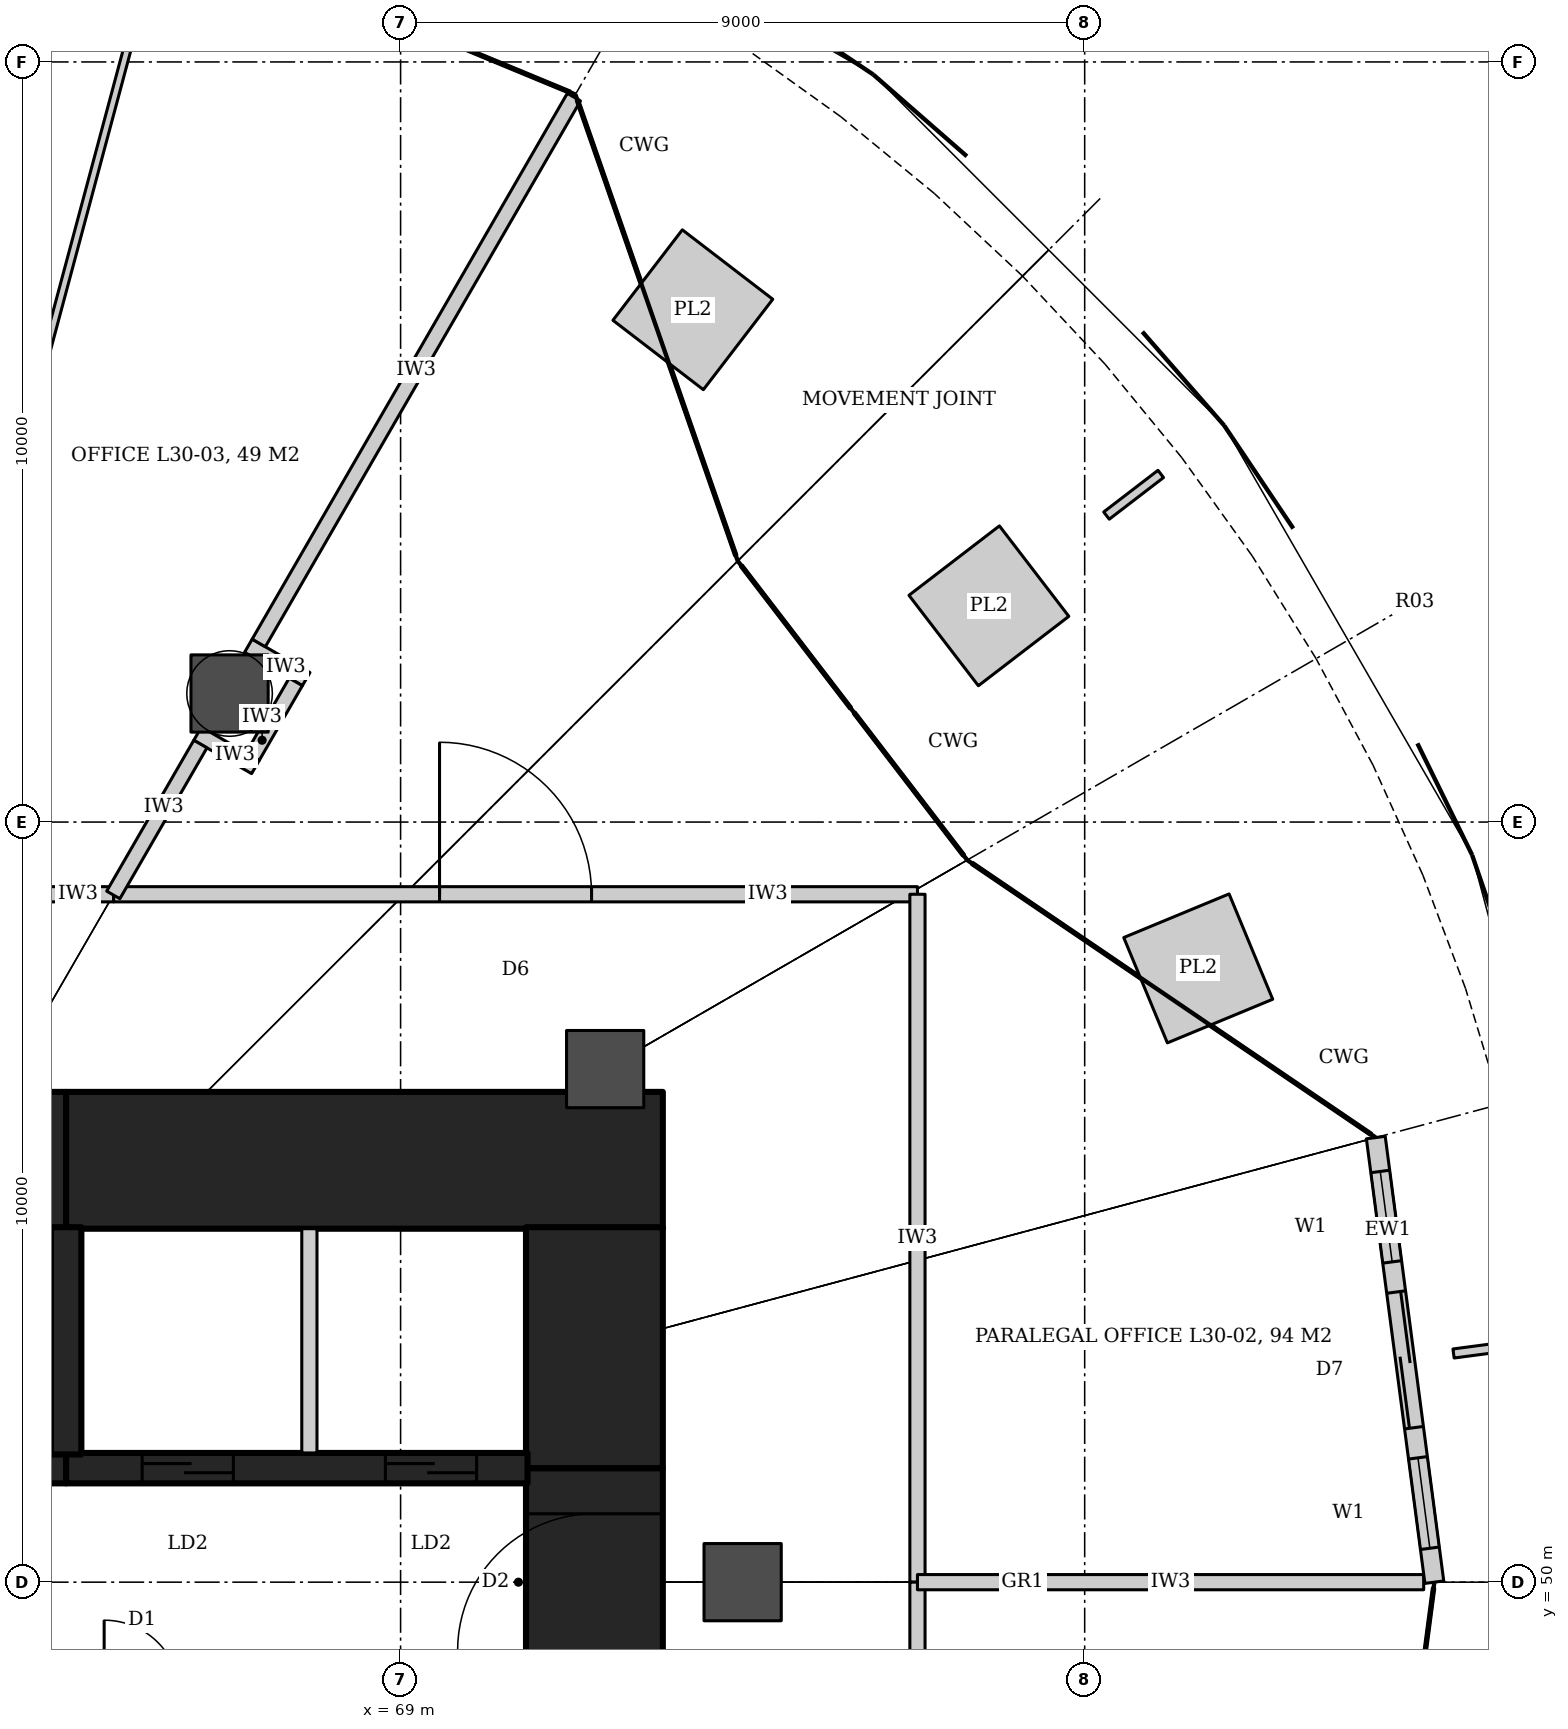
"""IFC4 building model, lengths in metres.
Left out: names, types, materials, properties, quantities, classifications, styles, units other than length and angle.
Written with IfcOpenShell. Run it as: python <this file> out.ifc"""

import sys

from ifc_helpers import new_model, si_unit, direction, frame, frame_2d, origin, origin_2d, place, context, subcontext, project, spatial, rectangle, hollow_circle, extrude, element, fill, save


model = new_model("IFC4")
c1 = context("Model", 3, precision=1e-05, world=origin(), true_north=direction((0.0, 1.0)))
c2 = subcontext(c1, "Body", "Model", "MODEL_VIEW")
j1 = project(units=[si_unit("LENGTHUNIT", "METRE"), si_unit("PLANEANGLEUNIT", "RADIAN")], contexts=[c1])
p1 = place(None, origin())
s1 = spatial("IfcSite", under=j1, at=p1, CompositionType="ELEMENT")
p2 = place(p1, origin())
s2 = spatial("IfcBuilding", under=s1, at=p2, CompositionType="ELEMENT")
p3 = place(p2, frame((0.0, 0.0, 135.2)))
s3 = spatial("IfcBuildingStorey", under=s2, at=p3, CompositionType="ELEMENT", Elevation=135.2)
p4 = place(p3, frame((55.4, 55.55, 0.0), z_axis=(0.0, 0.0, 1.0), x_axis=(1.0, 0.0, 0.0)))
e1 = element("IfcWall", 1, at=p4, inside=s3, PredefinedType="SHEAR", context=c2, shape_type="SweptSolid", body=[
    extrude(rectangle(XDim=9.2, YDim=1.8, at=frame_2d((4.6, 0.0))), origin(), (0.0, 0.0, 1.0), 4.2),
])
p5 = place(p3, frame((64.6, 55.55, 0.0), z_axis=(0.0, 0.0, 1.0), x_axis=(1.0, 0.0, 0.0)))
e2 = element("IfcWall", 2, at=p5, inside=s3, PredefinedType="SHEAR", context=c2, shape_type="SweptSolid", body=[
    extrude(rectangle(XDim=7.85, YDim=1.8, at=frame_2d((3.925, 0.0))), origin(), (0.0, 0.0, 1.0), 4.2),
])
p6 = place(p3, frame((71.55, 48.5, 0.0), z_axis=(0.0, 0.0, 1.0), x_axis=(0.0, 1.0, 0.0)))
e3 = element("IfcWall", 3, at=p6, inside=s3, PredefinedType="SHEAR", context=c2, shape_type="SweptSolid", body=[
    extrude(rectangle(XDim=3.0, YDim=1.8, at=frame_2d((1.5, 0.0))), origin(), (0.0, 0.0, 1.0), 4.2),
])
p7 = place(p6, frame((0.6, 0.0, 0.0)))
e4 = element("IfcOpeningElement", 4, at=p7, cuts=e3, PredefinedType="OPENING", context=c2, shape_type="SweptSolid", body=[
    extrude(rectangle(XDim=1.8, YDim=2.1, at=frame_2d((0.9, 1.05))), frame((0.0, 0.91, 0.0), z_axis=(0.0, -1.0, 0.0), x_axis=(1.0, 0.0, 0.0)), (0.0, 0.0, 1.0), 1.82),
])
p8 = place(p3, frame((71.55, 51.5, 0.0), z_axis=(0.0, 0.0, 1.0), x_axis=(0.0, 1.0, 0.0)))
e5 = element("IfcWall", 5, at=p8, inside=s3, PredefinedType="SHEAR", context=c2, shape_type="SweptSolid", body=[
    extrude(rectangle(XDim=3.17, YDim=1.8, at=frame_2d((1.585, 0.0))), origin(), (0.0, 0.0, 1.0), 4.2),
])
p9 = place(p3, frame((55.4, 51.5, 0.0), z_axis=(0.0, 0.0, 1.0), x_axis=(1.0, 0.0, 0.0)))
e6 = element("IfcWall", 6, at=p9, inside=s3, PredefinedType="SHEAR", context=c2, shape_type="SweptSolid", body=[
    extrude(rectangle(XDim=9.2, YDim=0.4, at=frame_2d((4.6, 0.0))), origin(), (0.0, 0.0, 1.0), 4.2),
])
p10 = place(p9, frame((1.6, 0.0, 0.0)))
e7 = element("IfcOpeningElement", 7, at=p10, cuts=e6, PredefinedType="OPENING", context=c2, shape_type="SweptSolid", body=[
    extrude(rectangle(XDim=0.8, YDim=2.1, at=frame_2d((0.4, 1.05))), frame((0.0, 0.21, 0.0), z_axis=(0.0, -1.0, 0.0), x_axis=(1.0, 0.0, 0.0)), (0.0, 0.0, 1.0), 0.42),
])
p11 = place(p9, frame((4.7, 0.0, 0.0)))
e8 = element("IfcOpeningElement", 8, at=p11, cuts=e6, PredefinedType="OPENING", context=c2, shape_type="SweptSolid", body=[
    extrude(rectangle(XDim=0.8, YDim=2.1, at=frame_2d((0.4, 1.05))), frame((0.0, 0.21, 0.0), z_axis=(0.0, -1.0, 0.0), x_axis=(1.0, 0.0, 0.0)), (0.0, 0.0, 1.0), 0.42),
])
p12 = place(p9, frame((7.3, 0.0, 0.0)))
e9 = element("IfcOpeningElement", 9, at=p12, cuts=e6, PredefinedType="OPENING", context=c2, shape_type="SweptSolid", body=[
    extrude(rectangle(XDim=0.8, YDim=2.1, at=frame_2d((0.4, 1.05))), frame((0.0, 0.21, 0.0), z_axis=(0.0, -1.0, 0.0), x_axis=(1.0, 0.0, 0.0)), (0.0, 0.0, 1.0), 0.42),
])
p13 = place(p3, frame((64.6, 51.5, 0.0), z_axis=(0.0, 0.0, 1.0), x_axis=(1.0, 0.0, 0.0)))
e10 = element("IfcWall", 10, at=p13, inside=s3, PredefinedType="SHEAR", context=c2, shape_type="SweptSolid", body=[
    extrude(rectangle(XDim=6.07, YDim=0.4, at=frame_2d((3.035, 0.0))), origin(), (0.0, 0.0, 1.0), 4.2),
])
p14 = place(p13, frame((1.0, 0.0, 0.0)))
e11 = element("IfcOpeningElement", 11, at=p14, cuts=e10, PredefinedType="OPENING", context=c2, shape_type="SweptSolid", body=[
    extrude(rectangle(XDim=1.2, YDim=2.1, at=frame_2d((0.6, 1.05))), frame((0.0, 0.21, 0.0), z_axis=(0.0, -1.0, 0.0), x_axis=(1.0, 0.0, 0.0)), (0.0, 0.0, 1.0), 0.42),
])
p15 = place(p13, frame((4.2, 0.0, 0.0)))
e12 = element("IfcOpeningElement", 12, at=p15, cuts=e10, PredefinedType="OPENING", context=c2, shape_type="SweptSolid", body=[
    extrude(rectangle(XDim=1.2, YDim=2.1, at=frame_2d((0.6, 1.05))), frame((0.0, 0.21, 0.0), z_axis=(0.0, -1.0, 0.0), x_axis=(1.0, 0.0, 0.0)), (0.0, 0.0, 1.0), 0.42),
])
p16 = place(p3, frame((64.6, 51.68, 0.0), z_axis=(0.0, 0.0, 1.0), x_axis=(0.0, 1.0, 0.0)))
e13 = element("IfcWall", 13, at=p16, inside=s3, PredefinedType="SHEAR", context=c2, shape_type="SweptSolid", body=[
    extrude(rectangle(XDim=2.99, YDim=0.4, at=frame_2d((1.495, 0.0))), origin(), (0.0, 0.0, 1.0), 4.2),
])
for number, where, z_axis, x_axis in (
    (14, (73.5, 50.0, 0.0), (0.0, 0.0, 1.0), (1.0, 0.0, 0.0)),
    (15, (71.691, 56.75, 0.0), (0.0, 0.0, 1.0), (1.0, 0.0, 0.0)),
    (16, (66.75, 61.691, 0.0), (0.0, 0.0, 1.0), (1.0, 0.0, 0.0)),
):
    element("IfcColumn", number, at=place(p3, frame(where, z_axis=z_axis, x_axis=x_axis)), inside=s3, PredefinedType="COLUMN", context=c2, shape_type="SweptSolid", body=[
        extrude(hollow_circle(Radius=0.508, WallThickness=0.05, at=origin_2d()), origin(), (0.0, 0.0, 1.0), 4.2),
    ])
p17 = place(p3, frame((62.425, 59.05, 0.0), z_axis=(0.0, 0.0, 1.0), x_axis=(1.0, 0.0, 0.0)))
e17 = element("IfcWall", 17, at=p17, inside=s3, PredefinedType="PARTITIONING", context=c2, shape_type="SweptSolid", body=[
    extrude(rectangle(XDim=2.8, YDim=0.2, at=frame_2d((1.4, 0.0))), origin(), (0.0, 0.0, 1.0), 3.04),
])
p18 = place(p17, frame((0.95, 0.0, 0.0)))
e18 = element("IfcOpeningElement", 18, at=p18, cuts=e17, PredefinedType="OPENING", context=c2, shape_type="SweptSolid", body=[
    extrude(rectangle(XDim=0.9, YDim=2.4, at=frame_2d((0.45, 1.2))), frame((0.0, 0.11, 0.0), z_axis=(0.0, -1.0, 0.0), x_axis=(1.0, 0.0, 0.0)), (0.0, 0.0, 1.0), 0.22),
])
p19 = place(p3, frame((65.225, 59.05, 0.0), z_axis=(0.0, 0.0, 1.0), x_axis=(1.0, 0.0, 0.0)))
e19 = element("IfcWall", 19, at=p19, inside=s3, PredefinedType="PARTITIONING", context=c2, shape_type="SweptSolid", body=[
    extrude(rectangle(XDim=10.575, YDim=0.2, at=frame_2d((5.288, 0.0))), origin(), (0.0, 0.0, 1.0), 3.02),
])
p20 = place(p19, frame((4.288, 0.0, 0.0)))
e20 = element("IfcOpeningElement", 20, at=p20, cuts=e19, PredefinedType="OPENING", context=c2, shape_type="SweptSolid", body=[
    extrude(rectangle(XDim=2.0, YDim=2.1, at=frame_2d((1.0, 1.05))), frame((0.0, 0.11, 0.0), z_axis=(0.0, -1.0, 0.0), x_axis=(1.0, 0.0, 0.0)), (0.0, 0.0, 1.0), 0.22),
])
p21 = place(p3, frame((75.8, 59.05, 0.0), z_axis=(0.0, 0.0, 1.0), x_axis=(0.0, -1.0, 0.0)))
e21 = element("IfcWall", 21, at=p21, inside=s3, PredefinedType="PARTITIONING", context=c2, shape_type="SweptSolid", body=[
    extrude(rectangle(XDim=9.05, YDim=0.2, at=frame_2d((4.525, 0.0))), origin(), (0.0, 0.0, 1.0), 3.04),
])
p22 = place(p3, frame((75.8, 50.0, 0.0), z_axis=(0.0, 0.0, 1.0), x_axis=(0.0, -1.0, 0.0)))
e22 = element("IfcWall", 22, at=p22, inside=s3, PredefinedType="PARTITIONING", context=c2, shape_type="SweptSolid", body=[
    extrude(rectangle(XDim=9.122, YDim=0.2, at=frame_2d((4.561, 0.0))), origin(), (0.0, 0.0, 1.0), 3.04),
])
p23 = place(p22, frame((4.061, 0.0, 0.0)))
e23 = element("IfcOpeningElement", 23, at=p23, cuts=e22, PredefinedType="OPENING", context=c2, shape_type="SweptSolid", body=[
    extrude(rectangle(XDim=1.0, YDim=2.1, at=frame_2d((0.5, 1.05))), frame((0.0, 0.11, 0.0), z_axis=(0.0, -1.0, 0.0), x_axis=(1.0, 0.0, 0.0)), (0.0, 0.0, 1.0), 0.22),
])
p24 = place(p3, frame((75.8, 50.0, 0.0), z_axis=(0.0, 0.0, 1.0), x_axis=(1.0, 0.0, 0.0)))
e24 = element("IfcWall", 24, at=p24, inside=s3, PredefinedType="PARTITIONING", context=c2, shape_type="SweptSolid", body=[
    extrude(rectangle(XDim=6.66, YDim=0.2, at=frame_2d((3.33, 0.0))), origin(), (0.0, 0.0, 1.0), 3.04),
])
for number, where, z_axis, x_axis in (
    (25, (66.329, 61.163, 0.0), (0.0, 0.0, 1.0), (0.866, -0.5, 0.0)),
    (26, (66.997, 62.32, 0.0), (0.0, 0.0, 1.0), (0.866, -0.5, 0.0)),
):
    element("IfcWall", number, at=place(p3, frame(where, z_axis=z_axis, x_axis=x_axis)), inside=s3, PredefinedType="PARTITIONING", context=c2, shape_type="SweptSolid", body=[
        extrude(rectangle(XDim=0.878, YDim=0.2, at=frame_2d((0.439, 0.0))), origin(), (0.0, 0.0, 1.0), 3.02),
    ])
p25 = place(p3, frame((67.053, 60.86, 0.0), z_axis=(0.0, 0.0, 1.0), x_axis=(0.499883687939, 0.866092546171, 0.0)))
e27 = element("IfcWall", 27, at=p25, inside=s3, PredefinedType="PARTITIONING", context=c2, shape_type="SweptSolid", body=[
    extrude(rectangle(XDim=1.136, YDim=0.2, at=frame_2d((0.568, 0.0))), origin(), (0.0, 0.0, 1.0), 3.02),
])
p26 = place(p3, frame((65.22, 59.041, 0.0), z_axis=(0.0, 0.0, 1.0), x_axis=(0.500011369369, 0.866018839577, 0.0)))
e28 = element("IfcWall", 28, at=p26, inside=s3, PredefinedType="PARTITIONING", context=c2, shape_type="SweptSolid", body=[
    extrude(rectangle(XDim=2.292, YDim=0.2, at=frame_2d((1.146, 0.0))), origin(), (0.0, 0.0, 1.0), 3.04),
])
p27 = place(p3, frame((67.134, 62.356, 0.0), z_axis=(0.0, 0.0, 1.0), x_axis=(0.499996007168, 0.866027709035, 0.0)))
e29 = element("IfcWall", 29, at=p27, inside=s3, PredefinedType="PARTITIONING", context=c2, shape_type="SweptSolid", body=[
    extrude(rectangle(XDim=8.292, YDim=0.2, at=frame_2d((4.146, 0.0))), origin(), (0.0, 0.0, 1.0), 3.04),
])
p28 = place(p3, frame((62.423, 59.041, 0.0), z_axis=(0.0, 0.0, 1.0), x_axis=(0.258825143973, 0.965924192081, 0.0)))
e30 = element("IfcWall", 30, at=p28, inside=s3, PredefinedType="PARTITIONING", context=c2, shape_type="SweptSolid", body=[
    extrude(rectangle(XDim=13.2, YDim=0.1, at=frame_2d((6.6, 0.0))), origin(), (0.0, 0.0, 1.0), 3.02),
])
p29 = place(p3, frame((82.6, 50.0, 0.0), z_axis=(0.0, 0.0, 1.0), x_axis=(-0.130556203128, 0.991440909901, 0.0)))
e31 = element("IfcWall", 31, at=p29, inside=s3, PredefinedType="SOLIDWALL", context=c2, shape_type="SweptSolid", body=[
    extrude(rectangle(XDim=5.9, YDim=0.25, at=frame_2d((2.95, 0.0))), origin(), (0.0, 0.0, 1.0), 4.04),
])
p30 = place(p29, frame((2.05, 0.0, 0.0)))
e32 = element("IfcOpeningElement", 32, at=p30, cuts=e31, PredefinedType="OPENING", context=c2, shape_type="SweptSolid", body=[
    extrude(rectangle(XDim=1.8, YDim=2.4, at=frame_2d((0.9, 1.2))), frame((0.0, 0.135, 0.0), z_axis=(0.0, -1.0, 0.0), x_axis=(1.0, 0.0, 0.0)), (0.0, 0.0, 1.0), 0.27),
])
p31 = place(p29, frame((0.45, 0.0, 0.0)))
e33 = element("IfcOpeningElement", 33, at=p31, cuts=e31, PredefinedType="OPENING", context=c2, shape_type="SweptSolid", body=[
    extrude(rectangle(XDim=1.2, YDim=2.4, at=frame_2d((0.6, 1.2))), frame((0.0, 0.135, 0.0), z_axis=(0.0, -1.0, 0.0), x_axis=(1.0, 0.0, 0.0)), (0.0, 0.0, 1.0), 0.27),
])
p32 = place(p29, frame((4.25, 0.0, 0.0)))
e34 = element("IfcOpeningElement", 34, at=p32, cuts=e31, PredefinedType="OPENING", context=c2, shape_type="SweptSolid", body=[
    extrude(rectangle(XDim=1.2, YDim=2.4, at=frame_2d((0.6, 1.2))), frame((0.0, 0.135, 0.0), z_axis=(0.0, -1.0, 0.0), x_axis=(1.0, 0.0, 0.0)), (0.0, 0.0, 1.0), 0.27),
])
p33 = place(p3, frame((67.8, 51.7, 0.0), z_axis=(0.0, 0.0, 1.0), x_axis=(0.0, 1.0, 0.0)))
e35 = element("IfcWall", 35, at=p33, inside=s3, PredefinedType="PARTITIONING", context=c2, shape_type="SweptSolid", body=[
    extrude(rectangle(XDim=2.95, YDim=0.2, at=frame_2d((1.475, 0.0))), origin(), (0.0, 0.0, 1.0), 4.2),
])
p34 = place(p20, origin())
e36 = element("IfcDoor", 36, at=p34, inside=s3, OperationType="DOUBLE_DOOR_DOUBLE_SWING", PredefinedType="DOOR", context=c2, shape_type="SweptSolid", body=[
    extrude(rectangle(XDim=2.0, YDim=2.1, at=frame_2d((1.0, 1.05))), frame((0.0, 0.025, 0.0), z_axis=(0.0, -1.0, 0.0), x_axis=(1.0, 0.0, 0.0)), (0.0, 0.0, 1.0), 0.05),
])
fill(e20, e36)
p35 = place(p30, origin())
e37 = element("IfcDoor", 37, at=p35, inside=s3, OperationType="DOUBLE_DOOR_SLIDING", PredefinedType="DOOR", context=c2, shape_type="SweptSolid", body=[
    extrude(rectangle(XDim=1.8, YDim=2.4, at=frame_2d((0.9, 1.2))), frame((0.0, 0.025, 0.0), z_axis=(0.0, -1.0, 0.0), x_axis=(1.0, 0.0, 0.0)), (0.0, 0.0, 1.0), 0.05),
])
fill(e32, e37)
p36 = place(p31, origin())
e38 = element("IfcWindow", 38, at=p36, inside=s3, PartitioningType="SINGLE_PANEL", PredefinedType="WINDOW", context=c2, shape_type="SweptSolid", body=[
    extrude(rectangle(XDim=1.2, YDim=2.4, at=frame_2d((0.6, 1.2))), frame((0.0, 0.03, 0.0), z_axis=(0.0, -1.0, 0.0), x_axis=(1.0, 0.0, 0.0)), (0.0, 0.0, 1.0), 0.06),
])
fill(e33, e38)
p37 = place(p32, origin())
e39 = element("IfcWindow", 39, at=p37, inside=s3, PartitioningType="SINGLE_PANEL", PredefinedType="WINDOW", context=c2, shape_type="SweptSolid", body=[
    extrude(rectangle(XDim=1.2, YDim=2.4, at=frame_2d((0.6, 1.2))), frame((0.0, 0.03, 0.0), z_axis=(0.0, -1.0, 0.0), x_axis=(1.0, 0.0, 0.0)), (0.0, 0.0, 1.0), 0.06),
])
fill(e34, e39)
p38 = place(p14, origin())
e40 = element("IfcDoor", 40, at=p38, inside=s3, OperationType="SLIDING_TO_LEFT", PredefinedType="DOOR", context=c2, shape_type="SweptSolid", body=[
    extrude(rectangle(XDim=1.2, YDim=2.1, at=frame_2d((0.6, 1.05))), frame((0.0, 0.025, 0.0), z_axis=(0.0, -1.0, 0.0), x_axis=(1.0, 0.0, 0.0)), (0.0, 0.0, 1.0), 0.05),
])
fill(e11, e40)
p39 = place(p15, origin())
e41 = element("IfcDoor", 41, at=p39, inside=s3, OperationType="SLIDING_TO_LEFT", PredefinedType="DOOR", context=c2, shape_type="SweptSolid", body=[
    extrude(rectangle(XDim=1.2, YDim=2.1, at=frame_2d((0.6, 1.05))), frame((0.0, 0.025, 0.0), z_axis=(0.0, -1.0, 0.0), x_axis=(1.0, 0.0, 0.0)), (0.0, 0.0, 1.0), 0.05),
])
fill(e12, e41)
p40 = place(p7, origin())
e42 = element("IfcDoor", 42, at=p40, inside=s3, OperationType="DOUBLE_DOOR_DOUBLE_SWING", PredefinedType="DOOR", context=c2, shape_type="SweptSolid", body=[
    extrude(rectangle(XDim=1.8, YDim=2.1, at=frame_2d((0.9, 1.05))), frame((0.0, 0.025, 0.0), z_axis=(0.0, -1.0, 0.0), x_axis=(1.0, 0.0, 0.0)), (0.0, 0.0, 1.0), 0.05),
])
fill(e4, e42)
save(model, sys.argv[1])
